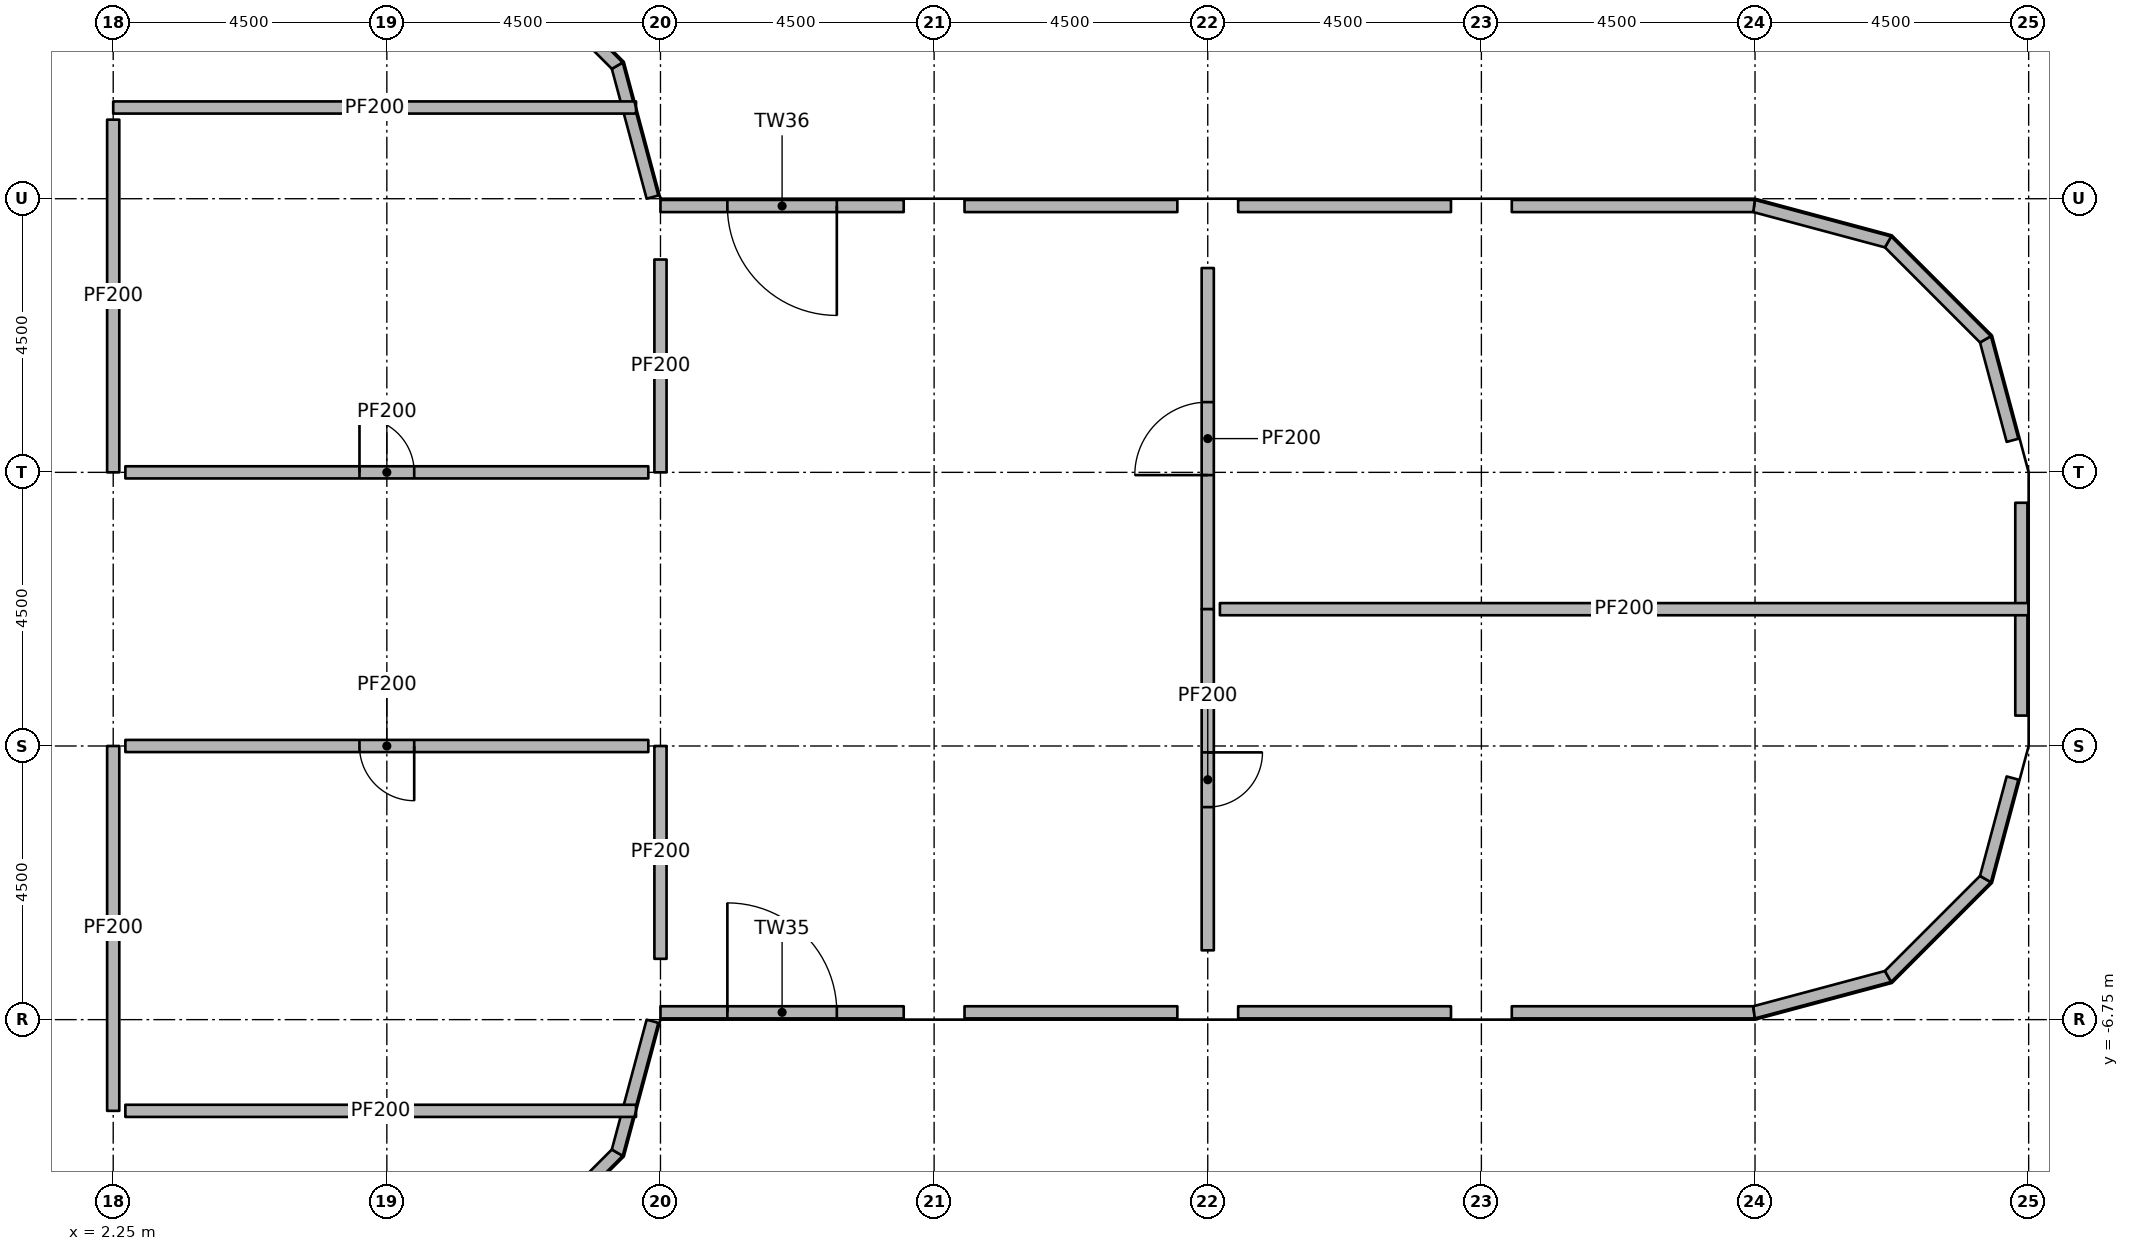
"""IFC4 building model, lengths in metres.
Left out: names, types, materials, properties, quantities, classifications, styles, units other than length and angle.
Written with IfcOpenShell. Run it as: python <this file> out.ifc"""

import sys

from ifc_helpers import new_model, si_unit, direction, frame, frame_2d, origin, origin_2d, place, context, subcontext, project, spatial, polyline, rectangle, outline, extrude, element, fill, save


model = new_model("IFC4")
c1 = context("Model", 3, precision=1e-05, world=origin(), true_north=direction((0.0, 1.0)))
c2 = subcontext(c1, "Body", "Model", "MODEL_VIEW")
j1 = project(units=[si_unit("LENGTHUNIT", "METRE"), si_unit("PLANEANGLEUNIT", "RADIAN")], contexts=[c1])
p1 = place(None, origin())
s1 = spatial("IfcSite", under=j1, at=p1, CompositionType="ELEMENT")
p2 = place(p1, origin())
s2 = spatial("IfcBuilding", under=s1, at=p2, CompositionType="ELEMENT")
p3 = place(p2, frame((0.0, 0.0, 81.6)))
s3 = spatial("IfcBuildingStorey", under=s2, at=p3, CompositionType="ELEMENT", Elevation=81.6)
for number, where, z_axis, x_axis in (
    (1, (6.25, -6.25, 0.0), (0.0, 0.0, 1.0), (1.0, 0.0, 0.0)),
    (2, (6.25, 6.25, 0.0), (0.0, 0.0, 1.0), (1.0, 0.0, 0.0)),
    (3, (10.75, -6.25, 0.0), (0.0, 0.0, 1.0), (1.0, 0.0, 0.0)),
    (4, (10.75, 6.25, 0.0), (0.0, 0.0, 1.0), (1.0, 0.0, 0.0)),
    (5, (15.75, -6.25, 0.0), (0.0, 0.0, 1.0), (1.0, 0.0, 0.0)),
    (6, (15.75, 6.25, 0.0), (0.0, 0.0, 1.0), (1.0, 0.0, 0.0)),
    (7, (20.25, -6.11, 0.0), (0.0, 0.0, 1.0), (1.0, 0.0, 0.0)),
    (8, (20.25, 6.11, 0.0), (0.0, 0.0, 1.0), (1.0, 0.0, 0.0)),
    (9, (24.75, -6.11, 0.0), (0.0, 0.0, 1.0), (1.0, 0.0, 0.0)),
    (10, (24.75, 6.11, 0.0), (0.0, 0.0, 1.0), (1.0, 0.0, 0.0)),
    (11, (28.908, -5.475, 0.0), (0.0, 0.0, 1.0), (1.0, 0.0, 0.0)),
    (12, (28.67, -2.25, 0.0), (0.0, 0.0, 1.0), (1.0, 0.0, 0.0)),
    (13, (28.67, 2.25, 0.0), (0.0, 0.0, 1.0), (1.0, 0.0, 0.0)),
    (14, (28.908, 5.475, 0.0), (0.0, 0.0, 1.0), (1.0, 0.0, 0.0)),
    (15, (33.11, -2.25, 0.0), (0.0, 0.0, 1.0), (1.0, 0.0, 0.0)),
    (16, (33.11, 2.25, 0.0), (0.0, 0.0, 1.0), (1.0, 0.0, 0.0)),
):
    element("IfcColumn", number, at=place(p3, frame(where, z_axis=z_axis, x_axis=x_axis)), inside=s3, PredefinedType="COLUMN", context=c2, shape_type="SweptSolid", body=[
        extrude(rectangle(XDim=1.0, YDim=1.0, at=origin_2d()), origin(), (0.0, 0.0, 1.0), 4.85),
    ])
p4 = place(p3, origin())
e17 = element("IfcWall", 17, at=p4, inside=s3, PredefinedType="SOLIDWALL", context=c2, shape_type="SweptSolid", body=[
    extrude(outline(polyline([(8.99, -10.629), (10.629, -8.99), (10.45, -8.886), (8.886, -10.45), (8.99, -10.629)])), origin(), (0.0, 0.0, 1.0), 4.85),
])
p5 = place(p3, origin())
e18 = element("IfcWall", 18, at=p5, inside=s3, PredefinedType="SOLIDWALL", context=c2, shape_type="SweptSolid", body=[
    extrude(outline(polyline([(10.629, -8.99), (11.215, -6.802), (11.022, -6.75), (10.45, -8.886), (10.629, -8.99)])), origin(), (0.0, 0.0, 1.0), 4.85),
])
p6 = place(p3, frame((11.25, -6.63, 0.0), z_axis=(0.0, 0.0, 1.0), x_axis=(1.0, 0.0, 0.0)))
e19 = element("IfcWall", 19, at=p6, inside=s3, PredefinedType="SOLIDWALL", context=c2, shape_type="SweptSolid", body=[
    extrude(rectangle(XDim=4.0, YDim=0.2, at=frame_2d((2.0, 0.0))), origin(), (0.0, 0.0, 1.0), 4.85),
])
p7 = place(p6, frame((1.1, 0.0, 0.0)))
e20 = element("IfcOpeningElement", 20, at=p7, cuts=e19, PredefinedType="OPENING", context=c2, shape_type="SweptSolid", body=[
    extrude(rectangle(XDim=1.8, YDim=2.4, at=frame_2d((0.9, 1.2))), frame((0.0, 0.11, 0.0), z_axis=(0.0, -1.0, 0.0), x_axis=(1.0, 0.0, 0.0)), (0.0, 0.0, 1.0), 0.22),
])
p8 = place(p3, origin())
e21 = element("IfcWall", 21, at=p8, inside=s3, PredefinedType="SOLIDWALL", context=c2, shape_type="SweptSolid", body=[
    extrude(outline(polyline([(16.25, -6.73), (19.75, -6.73), (19.75, -6.53), (16.25, -6.53), (16.25, -6.73)])), origin(), (0.0, 0.0, 1.0), 4.85),
])
p9 = place(p3, origin())
e22 = element("IfcWall", 22, at=p9, inside=s3, PredefinedType="SOLIDWALL", context=c2, shape_type="SweptSolid", body=[
    extrude(outline(polyline([(20.75, -6.73), (24.25, -6.73), (24.25, -6.53), (20.75, -6.53), (20.75, -6.73)])), origin(), (0.0, 0.0, 1.0), 4.85),
])
p10 = place(p3, origin())
e23 = element("IfcWall", 23, at=p10, inside=s3, PredefinedType="SOLIDWALL", context=c2, shape_type="SweptSolid", body=[
    extrude(outline(polyline([(25.25, -6.73), (29.247, -6.73), (29.221, -6.53), (25.25, -6.53), (25.25, -6.73)])), origin(), (0.0, 0.0, 1.0), 4.85),
])
p11 = place(p3, origin())
e24 = element("IfcWall", 24, at=p11, inside=s3, PredefinedType="SOLIDWALL", context=c2, shape_type="SweptSolid", body=[
    extrude(outline(polyline([(29.247, -6.73), (31.49, -6.129), (31.386, -5.95), (29.221, -6.53), (29.247, -6.73)])), origin(), (0.0, 0.0, 1.0), 4.85),
])
p12 = place(p3, origin())
e25 = element("IfcWall", 25, at=p12, inside=s3, PredefinedType="SOLIDWALL", context=c2, shape_type="SweptSolid", body=[
    extrude(outline(polyline([(31.49, -6.129), (33.129, -4.49), (32.95, -4.386), (31.386, -5.95), (31.49, -6.129)])), origin(), (0.0, 0.0, 1.0), 4.85),
])
p13 = place(p3, origin())
e26 = element("IfcWall", 26, at=p13, inside=s3, PredefinedType="SOLIDWALL", context=c2, shape_type="SweptSolid", body=[
    extrude(outline(polyline([(33.129, -4.49), (33.581, -2.802), (33.388, -2.751), (32.95, -4.386), (33.129, -4.49)])), origin(), (0.0, 0.0, 1.0), 4.85),
])
p14 = place(p3, origin())
e27 = element("IfcWall", 27, at=p14, inside=s3, PredefinedType="SOLIDWALL", context=c2, shape_type="SweptSolid", body=[
    extrude(outline(polyline([(33.73, -1.75), (33.73, 1.75), (33.53, 1.75), (33.53, -1.75), (33.73, -1.75)])), origin(), (0.0, 0.0, 1.0), 4.85),
])
p15 = place(p3, origin())
e28 = element("IfcWall", 28, at=p15, inside=s3, PredefinedType="SOLIDWALL", context=c2, shape_type="SweptSolid", body=[
    extrude(outline(polyline([(33.581, 2.802), (33.129, 4.49), (32.95, 4.386), (33.388, 2.75), (33.581, 2.802)])), origin(), (0.0, 0.0, 1.0), 4.85),
])
p16 = place(p3, origin())
e29 = element("IfcWall", 29, at=p16, inside=s3, PredefinedType="SOLIDWALL", context=c2, shape_type="SweptSolid", body=[
    extrude(outline(polyline([(33.129, 4.49), (31.49, 6.129), (31.386, 5.95), (32.95, 4.386), (33.129, 4.49)])), origin(), (0.0, 0.0, 1.0), 4.85),
])
p17 = place(p3, origin())
e30 = element("IfcWall", 30, at=p17, inside=s3, PredefinedType="SOLIDWALL", context=c2, shape_type="SweptSolid", body=[
    extrude(outline(polyline([(31.49, 6.129), (29.247, 6.73), (29.221, 6.53), (31.386, 5.95), (31.49, 6.129)])), origin(), (0.0, 0.0, 1.0), 4.85),
])
p18 = place(p3, origin())
e31 = element("IfcWall", 31, at=p18, inside=s3, PredefinedType="SOLIDWALL", context=c2, shape_type="SweptSolid", body=[
    extrude(outline(polyline([(29.247, 6.73), (25.25, 6.73), (25.25, 6.53), (29.221, 6.53), (29.247, 6.73)])), origin(), (0.0, 0.0, 1.0), 4.85),
])
p19 = place(p3, origin())
e32 = element("IfcWall", 32, at=p19, inside=s3, PredefinedType="SOLIDWALL", context=c2, shape_type="SweptSolid", body=[
    extrude(outline(polyline([(24.25, 6.73), (20.75, 6.73), (20.75, 6.53), (24.25, 6.53), (24.25, 6.73)])), origin(), (0.0, 0.0, 1.0), 4.85),
])
p20 = place(p3, origin())
e33 = element("IfcWall", 33, at=p20, inside=s3, PredefinedType="SOLIDWALL", context=c2, shape_type="SweptSolid", body=[
    extrude(outline(polyline([(19.75, 6.73), (16.25, 6.73), (16.25, 6.53), (19.75, 6.53), (19.75, 6.73)])), origin(), (0.0, 0.0, 1.0), 4.85),
])
p21 = place(p3, frame((15.25, 6.63, 0.0), z_axis=(0.0, 0.0, 1.0), x_axis=(-1.0, 0.0, 0.0)))
e34 = element("IfcWall", 34, at=p21, inside=s3, PredefinedType="SOLIDWALL", context=c2, shape_type="SweptSolid", body=[
    extrude(rectangle(XDim=4.0, YDim=0.2, at=frame_2d((2.0, 0.0))), origin(), (0.0, 0.0, 1.0), 4.85),
])
p22 = place(p21, frame((1.1, 0.0, 0.0)))
e35 = element("IfcOpeningElement", 35, at=p22, cuts=e34, PredefinedType="OPENING", context=c2, shape_type="SweptSolid", body=[
    extrude(rectangle(XDim=1.8, YDim=2.4, at=frame_2d((0.9, 1.2))), frame((0.0, 0.11, 0.0), z_axis=(0.0, -1.0, 0.0), x_axis=(1.0, 0.0, 0.0)), (0.0, 0.0, 1.0), 0.22),
])
p23 = place(p3, origin())
e36 = element("IfcWall", 36, at=p23, inside=s3, PredefinedType="SOLIDWALL", context=c2, shape_type="SweptSolid", body=[
    extrude(outline(polyline([(11.215, 6.802), (10.629, 8.99), (10.45, 8.886), (11.022, 6.75), (11.215, 6.802)])), origin(), (0.0, 0.0, 1.0), 4.85),
])
p24 = place(p3, origin())
e37 = element("IfcWall", 37, at=p24, inside=s3, PredefinedType="SOLIDWALL", context=c2, shape_type="SweptSolid", body=[
    extrude(outline(polyline([(10.629, 8.99), (8.99, 10.629), (8.886, 10.45), (10.45, 8.886), (10.629, 8.99)])), origin(), (0.0, 0.0, 1.0), 4.85),
])
p25 = place(p3, frame((10.848, 8.25, 0.0), z_axis=(0.0, 0.0, 1.0), x_axis=(-1.0, 0.0, 0.0)))
e38 = element("IfcWall", 38, at=p25, inside=s3, PredefinedType="PARTITIONING", context=c2, shape_type="SweptSolid", body=[
    extrude(rectangle(XDim=8.598, YDim=0.2, at=frame_2d((4.299, 0.0))), origin(), (0.0, 0.0, 1.0), 3.93),
])
p26 = place(p3, frame((2.25, 8.05, 0.0), z_axis=(0.0, 0.0, 1.0), x_axis=(0.0, -1.0, 0.0)))
e39 = element("IfcWall", 39, at=p26, inside=s3, PredefinedType="PARTITIONING", context=c2, shape_type="SweptSolid", body=[
    extrude(rectangle(XDim=5.8, YDim=0.2, at=frame_2d((2.9, 0.0))), origin(), (0.0, 0.0, 1.0), 3.918),
])
p27 = place(p3, frame((2.25, -2.25, 0.0), z_axis=(0.0, 0.0, 1.0), x_axis=(0.0, -1.0, 0.0)))
e40 = element("IfcWall", 40, at=p27, inside=s3, PredefinedType="PARTITIONING", context=c2, shape_type="SweptSolid", body=[
    extrude(rectangle(XDim=6.0, YDim=0.2, at=frame_2d((3.0, 0.0))), origin(), (0.0, 0.0, 1.0), 3.918),
])
p28 = place(p3, frame((2.45, -8.25, 0.0), z_axis=(0.0, 0.0, 1.0), x_axis=(1.0, 0.0, 0.0)))
e41 = element("IfcWall", 41, at=p28, inside=s3, PredefinedType="PARTITIONING", context=c2, shape_type="SweptSolid", body=[
    extrude(rectangle(XDim=8.398, YDim=0.2, at=frame_2d((4.199, 0.0))), origin(), (0.0, 0.0, 1.0), 3.93),
])
p29 = place(p3, frame((11.25, 5.75, 0.0), z_axis=(0.0, 0.0, 1.0), x_axis=(0.0, -1.0, 0.0)))
e42 = element("IfcWall", 42, at=p29, inside=s3, PredefinedType="PARTITIONING", context=c2, shape_type="SweptSolid", body=[
    extrude(rectangle(XDim=3.5, YDim=0.2, at=frame_2d((1.75, 0.0))), origin(), (0.0, 0.0, 1.0), 4.85),
])
p30 = place(p3, frame((2.45, 2.25, 0.0), z_axis=(0.0, 0.0, 1.0), x_axis=(1.0, 0.0, 0.0)))
e43 = element("IfcWall", 43, at=p30, inside=s3, PredefinedType="PARTITIONING", context=c2, shape_type="SweptSolid", body=[
    extrude(rectangle(XDim=8.6, YDim=0.2, at=frame_2d((4.3, 0.0))), origin(), (0.0, 0.0, 1.0), 4.073),
])
p31 = place(p30, frame((3.85, 0.0, 0.0)))
e44 = element("IfcOpeningElement", 44, at=p31, cuts=e43, PredefinedType="OPENING", context=c2, shape_type="SweptSolid", body=[
    extrude(rectangle(XDim=0.9, YDim=2.1, at=frame_2d((0.45, 1.05))), frame((0.0, 0.11, 0.0), z_axis=(0.0, -1.0, 0.0), x_axis=(1.0, 0.0, 0.0)), (0.0, 0.0, 1.0), 0.22),
])
p32 = place(p3, frame((11.25, -2.25, 0.0), z_axis=(0.0, 0.0, 1.0), x_axis=(0.0, -1.0, 0.0)))
e45 = element("IfcWall", 45, at=p32, inside=s3, PredefinedType="PARTITIONING", context=c2, shape_type="SweptSolid", body=[
    extrude(rectangle(XDim=3.5, YDim=0.2, at=frame_2d((1.75, 0.0))), origin(), (0.0, 0.0, 1.0), 4.85),
])
p33 = place(p3, frame((11.05, -2.25, 0.0), z_axis=(0.0, 0.0, 1.0), x_axis=(-1.0, 0.0, 0.0)))
e46 = element("IfcWall", 46, at=p33, inside=s3, PredefinedType="PARTITIONING", context=c2, shape_type="SweptSolid", body=[
    extrude(rectangle(XDim=8.6, YDim=0.2, at=frame_2d((4.3, 0.0))), origin(), (0.0, 0.0, 1.0), 4.073),
])
p34 = place(p33, frame((3.85, 0.0, 0.0)))
e47 = element("IfcOpeningElement", 47, at=p34, cuts=e46, PredefinedType="OPENING", context=c2, shape_type="SweptSolid", body=[
    extrude(rectangle(XDim=0.9, YDim=2.1, at=frame_2d((0.45, 1.05))), frame((0.0, 0.11, 0.0), z_axis=(0.0, -1.0, 0.0), x_axis=(1.0, 0.0, 0.0)), (0.0, 0.0, 1.0), 0.22),
])
p35 = place(p3, frame((20.25, 0.0, 0.0), z_axis=(0.0, 0.0, 1.0), x_axis=(0.0, 1.0, 0.0)))
e48 = element("IfcWall", 48, at=p35, inside=s3, PredefinedType="PARTITIONING", context=c2, shape_type="SweptSolid", body=[
    extrude(rectangle(XDim=5.61, YDim=0.2, at=frame_2d((2.805, 0.0))), origin(), (0.0, 0.0, 1.0), 4.073),
])
p36 = place(p35, frame((2.205, 0.0, 0.0)))
e49 = element("IfcOpeningElement", 49, at=p36, cuts=e48, PredefinedType="OPENING", context=c2, shape_type="SweptSolid", body=[
    extrude(rectangle(XDim=1.2, YDim=2.1, at=frame_2d((0.6, 1.05))), frame((0.0, 0.11, 0.0), z_axis=(0.0, -1.0, 0.0), x_axis=(1.0, 0.0, 0.0)), (0.0, 0.0, 1.0), 0.22),
])
p37 = place(p3, frame((20.25, 0.0, 0.0), z_axis=(0.0, 0.0, 1.0), x_axis=(0.0, -1.0, 0.0)))
e50 = element("IfcWall", 50, at=p37, inside=s3, PredefinedType="PARTITIONING", context=c2, shape_type="SweptSolid", body=[
    extrude(rectangle(XDim=5.61, YDim=0.2, at=frame_2d((2.805, 0.0))), origin(), (0.0, 0.0, 1.0), 4.073),
])
p38 = place(p37, frame((2.355, 0.0, 0.0)))
e51 = element("IfcOpeningElement", 51, at=p38, cuts=e50, PredefinedType="OPENING", context=c2, shape_type="SweptSolid", body=[
    extrude(rectangle(XDim=0.9, YDim=2.1, at=frame_2d((0.45, 1.05))), frame((0.0, 0.11, 0.0), z_axis=(0.0, -1.0, 0.0), x_axis=(1.0, 0.0, 0.0)), (0.0, 0.0, 1.0), 0.22),
])
p39 = place(p3, frame((33.75, 0.0, 0.0), z_axis=(0.0, 0.0, 1.0), x_axis=(-1.0, 0.0, 0.0)))
e52 = element("IfcWall", 52, at=p39, inside=s3, PredefinedType="PARTITIONING", context=c2, shape_type="SweptSolid", body=[
    extrude(rectangle(XDim=13.3, YDim=0.2, at=frame_2d((6.65, 0.0))), origin(), (0.0, 0.0, 1.0), 3.93),
])
p40 = place(p7, origin())
e53 = element("IfcDoor", 53, at=p40, inside=s3, OperationType="SINGLE_SWING_LEFT", PredefinedType="DOOR", context=c2, shape_type="SweptSolid", body=[
    extrude(rectangle(XDim=1.8, YDim=2.4, at=frame_2d((0.9, 1.2))), frame((0.0, 0.025, 0.0), z_axis=(0.0, -1.0, 0.0), x_axis=(1.0, 0.0, 0.0)), (0.0, 0.0, 1.0), 0.05),
])
fill(e20, e53)
p41 = place(p22, origin())
e54 = element("IfcDoor", 54, at=p41, inside=s3, OperationType="SINGLE_SWING_LEFT", PredefinedType="DOOR", context=c2, shape_type="SweptSolid", body=[
    extrude(rectangle(XDim=1.8, YDim=2.4, at=frame_2d((0.9, 1.2))), frame((0.0, 0.025, 0.0), z_axis=(0.0, -1.0, 0.0), x_axis=(1.0, 0.0, 0.0)), (0.0, 0.0, 1.0), 0.05),
])
fill(e35, e54)
p42 = place(p31, origin())
e55 = element("IfcDoor", 55, at=p42, inside=s3, OperationType="SINGLE_SWING_LEFT", PredefinedType="DOOR", context=c2, shape_type="SweptSolid", body=[
    extrude(rectangle(XDim=0.9, YDim=2.1, at=frame_2d((0.45, 1.05))), frame((0.0, 0.025, 0.0), z_axis=(0.0, -1.0, 0.0), x_axis=(1.0, 0.0, 0.0)), (0.0, 0.0, 1.0), 0.05),
])
fill(e44, e55)
p43 = place(p34, origin())
e56 = element("IfcDoor", 56, at=p43, inside=s3, OperationType="SINGLE_SWING_LEFT", PredefinedType="DOOR", context=c2, shape_type="SweptSolid", body=[
    extrude(rectangle(XDim=0.9, YDim=2.1, at=frame_2d((0.45, 1.05))), frame((0.0, 0.025, 0.0), z_axis=(0.0, -1.0, 0.0), x_axis=(1.0, 0.0, 0.0)), (0.0, 0.0, 1.0), 0.05),
])
fill(e47, e56)
p44 = place(p36, origin())
e57 = element("IfcDoor", 57, at=p44, inside=s3, OperationType="SINGLE_SWING_LEFT", PredefinedType="DOOR", context=c2, shape_type="SweptSolid", body=[
    extrude(rectangle(XDim=1.2, YDim=2.1, at=frame_2d((0.6, 1.05))), frame((0.0, 0.025, 0.0), z_axis=(0.0, -1.0, 0.0), x_axis=(1.0, 0.0, 0.0)), (0.0, 0.0, 1.0), 0.05),
])
fill(e49, e57)
p45 = place(p38, origin())
e58 = element("IfcDoor", 58, at=p45, inside=s3, OperationType="SINGLE_SWING_LEFT", PredefinedType="DOOR", context=c2, shape_type="SweptSolid", body=[
    extrude(rectangle(XDim=0.9, YDim=2.1, at=frame_2d((0.45, 1.05))), frame((0.0, 0.025, 0.0), z_axis=(0.0, -1.0, 0.0), x_axis=(1.0, 0.0, 0.0)), (0.0, 0.0, 1.0), 0.05),
])
fill(e51, e58)
save(model, sys.argv[1])
